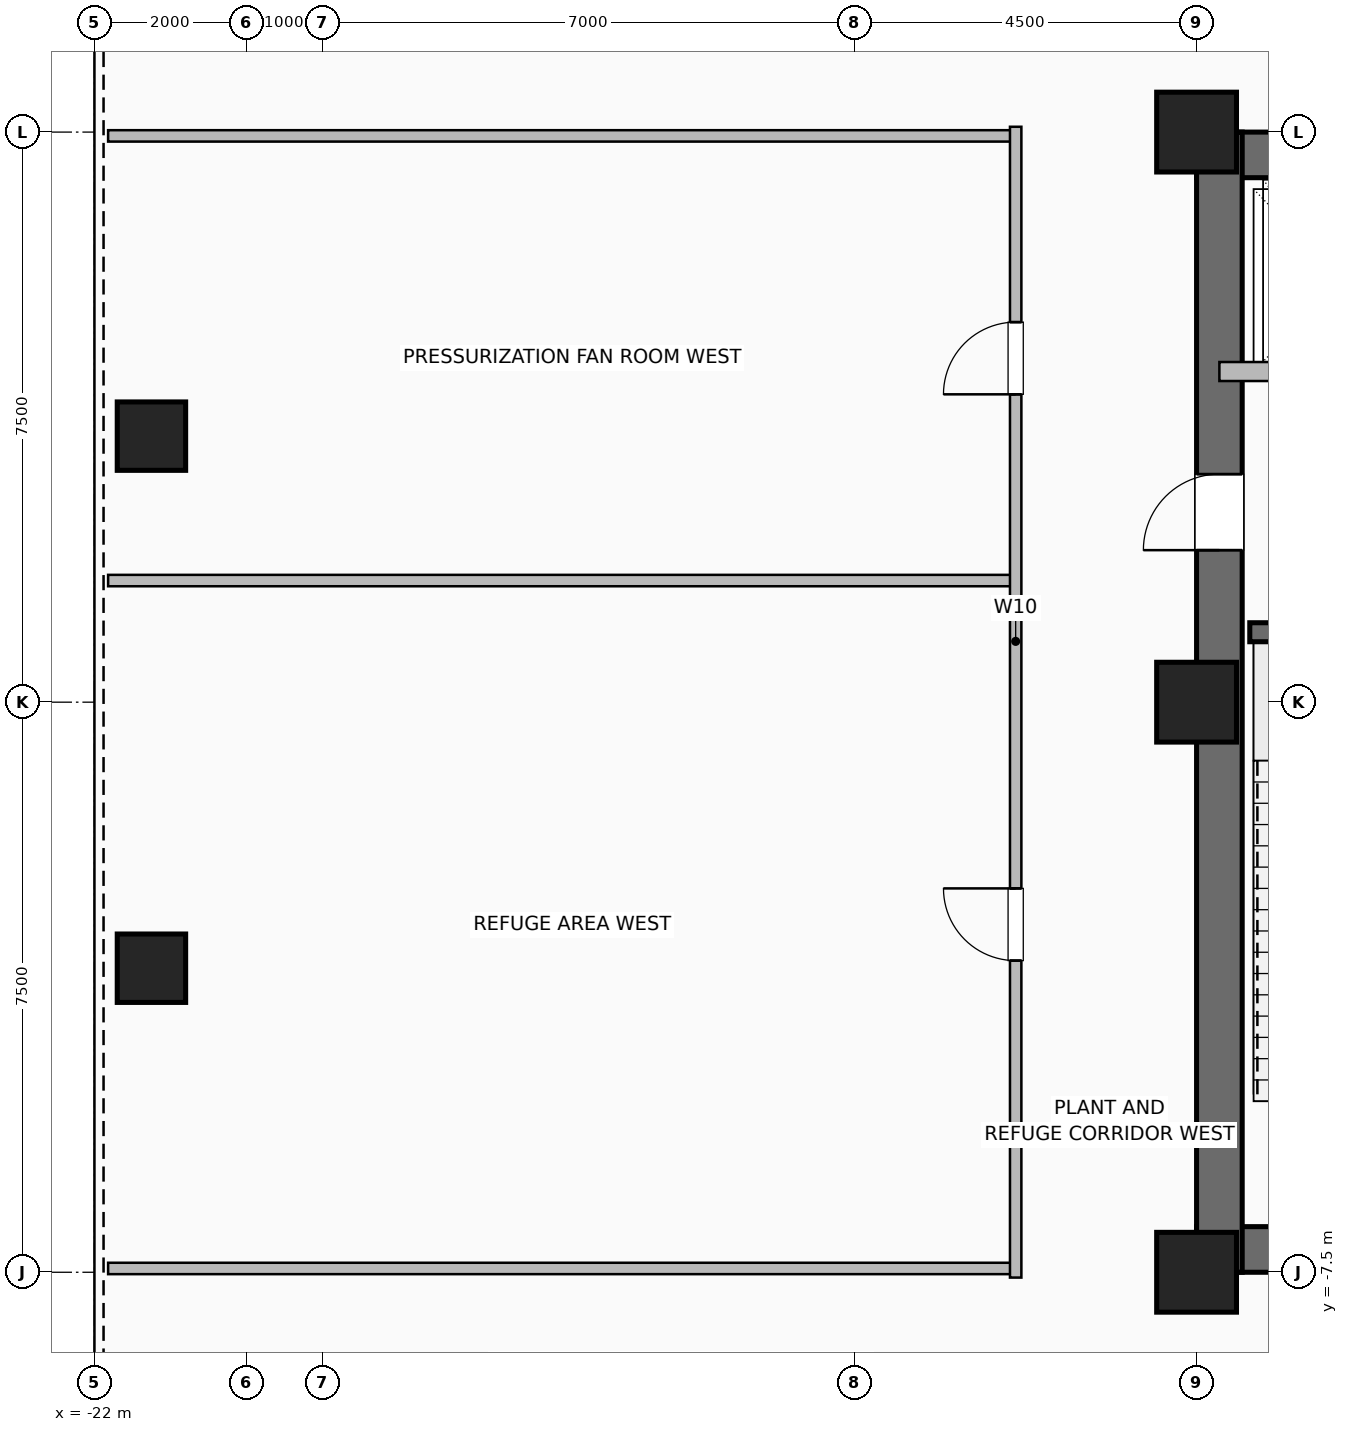
"""IFC4 building model, lengths in metres.
Left out: names, types, materials, properties, quantities, classifications, styles, units other than length and angle.
Written with IfcOpenShell. Run it as: python <this file> out.ifc"""

import sys

from ifc_helpers import new_model, si_unit, direction, frame, frame_2d, origin, origin_2d, place, context, subcontext, project, spatial, rectangle, hollow_rectangle, extrude, element, fill, save


model = new_model("IFC4")
c1 = context("Model", 3, precision=1e-05, world=origin(), true_north=direction((0.0, 1.0)))
c2 = subcontext(c1, "Body", "Model", "MODEL_VIEW")
j1 = project(units=[si_unit("LENGTHUNIT", "METRE"), si_unit("PLANEANGLEUNIT", "RADIAN")], contexts=[c1])
p1 = place(None, origin())
s1 = spatial("IfcSite", under=j1, at=p1, CompositionType="ELEMENT")
p2 = place(p1, origin())
s2 = spatial("IfcBuilding", under=s1, at=p2, CompositionType="ELEMENT")
p3 = place(p2, frame((0.0, 0.0, 160.2)))
s3 = spatial("IfcBuildingStorey", under=s2, at=p3, CompositionType="ELEMENT", Elevation=160.2)
for number, where, z_axis, x_axis in (
    (1, (-7.5, -7.5, 0.0), (0.0, 0.0, 1.0), (1.0, 0.0, 0.0)),
    (2, (-7.5, 7.5, 0.0), (0.0, 0.0, 1.0), (1.0, 0.0, 0.0)),
    (3, (-7.5, 0.0, 0.0), (0.0, 0.0, 1.0), (1.0, 0.0, 0.0)),
):
    element("IfcColumn", number, at=place(p3, frame(where, z_axis=z_axis, x_axis=x_axis)), inside=s3, PredefinedType="COLUMN", context=c2, shape_type="SweptSolid", body=[
        extrude(hollow_rectangle(XDim=1.05, YDim=1.05, WallThickness=0.05, at=origin_2d()), origin(), (0.0, 0.0, 1.0), 6.0),
    ])
for number, where, z_axis, x_axis in (
    (4, (-21.25, -3.5, 0.0), (0.0, 0.0, 1.0), (1.0, 0.0, 0.0)),
    (5, (-21.25, 3.5, 0.0), (0.0, 0.0, 1.0), (1.0, 0.0, 0.0)),
):
    element("IfcColumn", number, at=place(p3, frame(where, z_axis=z_axis, x_axis=x_axis)), inside=s3, PredefinedType="COLUMN", context=c2, shape_type="SweptSolid", body=[
        extrude(hollow_rectangle(XDim=0.9, YDim=0.9, WallThickness=0.045, at=origin_2d()), origin(), (0.0, 0.0, 1.0), 5.6),
    ])
p4 = place(p3, frame((-7.5, -7.2, 0.0), z_axis=(0.0, 0.0, 1.0), x_axis=(1.0, 0.0, 0.0)))
e6 = element("IfcWall", 6, at=p4, inside=s3, PredefinedType="SHEAR", context=c2, shape_type="SweptSolid", body=[
    extrude(rectangle(XDim=15.0, YDim=0.6, at=frame_2d((7.5, 0.0))), origin(), (0.0, 0.0, 1.0), 5.6),
])
p5 = place(p4, frame((1.55, 0.0, 0.0)))
e7 = element("IfcOpeningElement", 7, at=p5, cuts=e6, PredefinedType="OPENING", context=c2, shape_type="SweptSolid", body=[
    extrude(rectangle(XDim=1.05, YDim=2.08, at=frame_2d((0.525, 1.04))), frame((0.0, 0.31, 0.0), z_axis=(0.0, -1.0, 0.0), x_axis=(1.0, 0.0, 0.0)), (0.0, 0.0, 1.0), 0.62),
])
p6 = place(p4, frame((12.4, 0.0, 0.0)))
e8 = element("IfcOpeningElement", 8, at=p6, cuts=e6, PredefinedType="OPENING", context=c2, shape_type="SweptSolid", body=[
    extrude(rectangle(XDim=1.05, YDim=2.08, at=frame_2d((0.525, 1.04))), frame((0.0, 0.31, 0.0), z_axis=(0.0, -1.0, 0.0), x_axis=(1.0, 0.0, 0.0)), (0.0, 0.0, 1.0), 0.62),
])
p7 = place(p4, frame((4.95, 0.0, 0.0)))
e9 = element("IfcOpeningElement", 9, at=p7, cuts=e6, PredefinedType="OPENING", context=c2, shape_type="SweptSolid", body=[
    extrude(rectangle(XDim=1.0, YDim=2.08, at=frame_2d((0.5, 1.04))), frame((0.0, 0.31, 0.0), z_axis=(0.0, -1.0, 0.0), x_axis=(1.0, 0.0, 0.0)), (0.0, 0.0, 1.0), 0.62),
])
p8 = place(p4, frame((7.05, 0.0, 0.0)))
e10 = element("IfcOpeningElement", 10, at=p8, cuts=e6, PredefinedType="OPENING", context=c2, shape_type="SweptSolid", body=[
    extrude(rectangle(XDim=1.0, YDim=2.08, at=frame_2d((0.5, 1.04))), frame((0.0, 0.31, 0.0), z_axis=(0.0, -1.0, 0.0), x_axis=(1.0, 0.0, 0.0)), (0.0, 0.0, 1.0), 0.62),
])
p9 = place(p4, frame((9.15, 0.0, 0.0)))
e11 = element("IfcOpeningElement", 11, at=p9, cuts=e6, PredefinedType="OPENING", context=c2, shape_type="SweptSolid", body=[
    extrude(rectangle(XDim=1.0, YDim=2.08, at=frame_2d((0.5, 1.04))), frame((0.0, 0.31, 0.0), z_axis=(0.0, -1.0, 0.0), x_axis=(1.0, 0.0, 0.0)), (0.0, 0.0, 1.0), 0.62),
])
p10 = place(p3, frame((-7.5, 7.2, 0.0), z_axis=(0.0, 0.0, 1.0), x_axis=(1.0, 0.0, 0.0)))
e12 = element("IfcWall", 12, at=p10, inside=s3, PredefinedType="SHEAR", context=c2, shape_type="SweptSolid", body=[
    extrude(rectangle(XDim=15.0, YDim=0.6, at=frame_2d((7.5, 0.0))), origin(), (0.0, 0.0, 1.0), 5.6),
])
p11 = place(p3, frame((-7.2, -7.5, 0.0), z_axis=(0.0, 0.0, 1.0), x_axis=(0.0, 1.0, 0.0)))
e13 = element("IfcWall", 13, at=p11, inside=s3, PredefinedType="SHEAR", context=c2, shape_type="SweptSolid", body=[
    extrude(rectangle(XDim=15.0, YDim=0.6, at=frame_2d((7.5, 0.0))), origin(), (0.0, 0.0, 1.0), 5.6),
])
p12 = place(p11, frame((9.5, 0.0, 0.0)))
e14 = element("IfcOpeningElement", 14, at=p12, cuts=e13, PredefinedType="OPENING", context=c2, shape_type="SweptSolid", body=[
    extrude(rectangle(XDim=1.0, YDim=2.08, at=frame_2d((0.5, 1.04))), frame((0.0, 0.31, 0.0), z_axis=(0.0, -1.0, 0.0), x_axis=(1.0, 0.0, 0.0)), (0.0, 0.0, 1.0), 0.62),
])
p13 = place(p3, frame((-6.8, 0.92, 0.0), z_axis=(0.0, 0.0, 1.0), x_axis=(1.0, 0.0, 0.0)))
e15 = element("IfcWall", 15, at=p13, inside=s3, PredefinedType="SHEAR", context=c2, shape_type="SweptSolid", body=[
    extrude(rectangle(XDim=3.33, YDim=0.25, at=frame_2d((1.665, 0.0))), origin(), (0.0, 0.0, 1.0), 5.6),
])
p14 = place(p3, frame((-7.2, 4.35, 0.0), z_axis=(0.0, 0.0, 1.0), x_axis=(1.0, 0.0, 0.0)))
e16 = element("IfcWall", 16, at=p14, inside=s3, PredefinedType="SHEAR", context=c2, shape_type="SweptSolid", body=[
    extrude(rectangle(XDim=2.7, YDim=0.25, at=frame_2d((1.35, 0.0))), origin(), (0.0, 0.0, 1.0), 5.6),
])
p15 = place(p14, frame((0.75, 0.0, 0.0)))
e17 = element("IfcOpeningElement", 17, at=p15, cuts=e16, PredefinedType="OPENING", context=c2, shape_type="SweptSolid", body=[
    extrude(rectangle(XDim=1.2, YDim=2.2, at=frame_2d((0.6, 1.1))), frame((0.0, 0.135, 0.0), z_axis=(0.0, -1.0, 0.0), x_axis=(1.0, 0.0, 0.0)), (0.0, 0.0, 1.0), 0.27),
])
p16 = place(p3, frame((-21.82, -7.45, 0.0), z_axis=(0.0, 0.0, 1.0), x_axis=(1.0, 0.0, 0.0)))
e18 = element("IfcWall", 18, at=p16, inside=s3, PredefinedType="PARTITIONING", context=c2, shape_type="SweptSolid", body=[
    extrude(rectangle(XDim=11.94, YDim=0.15, at=frame_2d((5.97, 0.0))), origin(), (0.0, 0.0, 1.0), 3.975),
])
p17 = place(p3, frame((-21.82, 1.6, 0.0), z_axis=(0.0, 0.0, 1.0), x_axis=(1.0, 0.0, 0.0)))
e19 = element("IfcWall", 19, at=p17, inside=s3, PredefinedType="PARTITIONING", context=c2, shape_type="SweptSolid", body=[
    extrude(rectangle(XDim=11.94, YDim=0.15, at=frame_2d((5.97, 0.0))), origin(), (0.0, 0.0, 1.0), 5.6),
])
p18 = place(p3, frame((-21.82, 7.45, 0.0), z_axis=(0.0, 0.0, 1.0), x_axis=(1.0, 0.0, 0.0)))
e20 = element("IfcWall", 20, at=p18, inside=s3, PredefinedType="PARTITIONING", context=c2, shape_type="SweptSolid", body=[
    extrude(rectangle(XDim=11.94, YDim=0.15, at=frame_2d((5.97, 0.0))), origin(), (0.0, 0.0, 1.0), 3.975),
])
p19 = place(p3, frame((-9.88, -7.57, 0.0), z_axis=(0.0, 0.0, 1.0), x_axis=(0.0, 1.0, 0.0)))
e21 = element("IfcWall", 21, at=p19, inside=s3, PredefinedType="PARTITIONING", context=c2, shape_type="SweptSolid", body=[
    extrude(rectangle(XDim=15.14, YDim=0.15, at=frame_2d((7.57, 0.0))), origin(), (0.0, 0.0, 1.0), 5.6),
])
p20 = place(p19, frame((4.17, 0.0, 0.0)))
e22 = element("IfcOpeningElement", 22, at=p20, cuts=e21, PredefinedType="OPENING", context=c2, shape_type="SweptSolid", body=[
    extrude(rectangle(XDim=0.95, YDim=2.06, at=frame_2d((0.475, 1.03))), frame((0.0, 0.085, 0.0), z_axis=(0.0, -1.0, 0.0), x_axis=(1.0, 0.0, 0.0)), (0.0, 0.0, 1.0), 0.17),
])
p21 = place(p19, frame((11.62, 0.0, 0.0)))
e23 = element("IfcOpeningElement", 23, at=p21, cuts=e21, PredefinedType="OPENING", context=c2, shape_type="SweptSolid", body=[
    extrude(rectangle(XDim=0.95, YDim=2.06, at=frame_2d((0.475, 1.03))), frame((0.0, 0.085, 0.0), z_axis=(0.0, -1.0, 0.0), x_axis=(1.0, 0.0, 0.0)), (0.0, 0.0, 1.0), 0.17),
])
p22 = place(p12, origin())
e24 = element("IfcDoor", 24, at=p22, inside=s3, OperationType="SINGLE_SWING_LEFT", PredefinedType="DOOR", context=c2, shape_type="SweptSolid", body=[
    extrude(rectangle(XDim=1.0, YDim=2.08, at=frame_2d((0.5, 1.04))), frame((0.0, 0.025, 0.0), z_axis=(0.0, -1.0, 0.0), x_axis=(1.0, 0.0, 0.0)), (0.0, 0.0, 1.0), 0.05),
])
fill(e14, e24)
p23 = place(p20, origin())
e25 = element("IfcDoor", 25, at=p23, inside=s3, OperationType="SINGLE_SWING_RIGHT", PredefinedType="DOOR", context=c2, shape_type="SweptSolid", body=[
    extrude(rectangle(XDim=0.95, YDim=2.06, at=frame_2d((0.475, 1.03))), frame((0.0, 0.025, 0.0), z_axis=(0.0, -1.0, 0.0), x_axis=(1.0, 0.0, 0.0)), (0.0, 0.0, 1.0), 0.05),
])
fill(e22, e25)
p24 = place(p21, origin())
e26 = element("IfcDoor", 26, at=p24, inside=s3, OperationType="SINGLE_SWING_LEFT", PredefinedType="DOOR", context=c2, shape_type="SweptSolid", body=[
    extrude(rectangle(XDim=0.95, YDim=2.06, at=frame_2d((0.475, 1.03))), frame((0.0, 0.025, 0.0), z_axis=(0.0, -1.0, 0.0), x_axis=(1.0, 0.0, 0.0)), (0.0, 0.0, 1.0), 0.05),
])
fill(e23, e26)
save(model, sys.argv[1])
